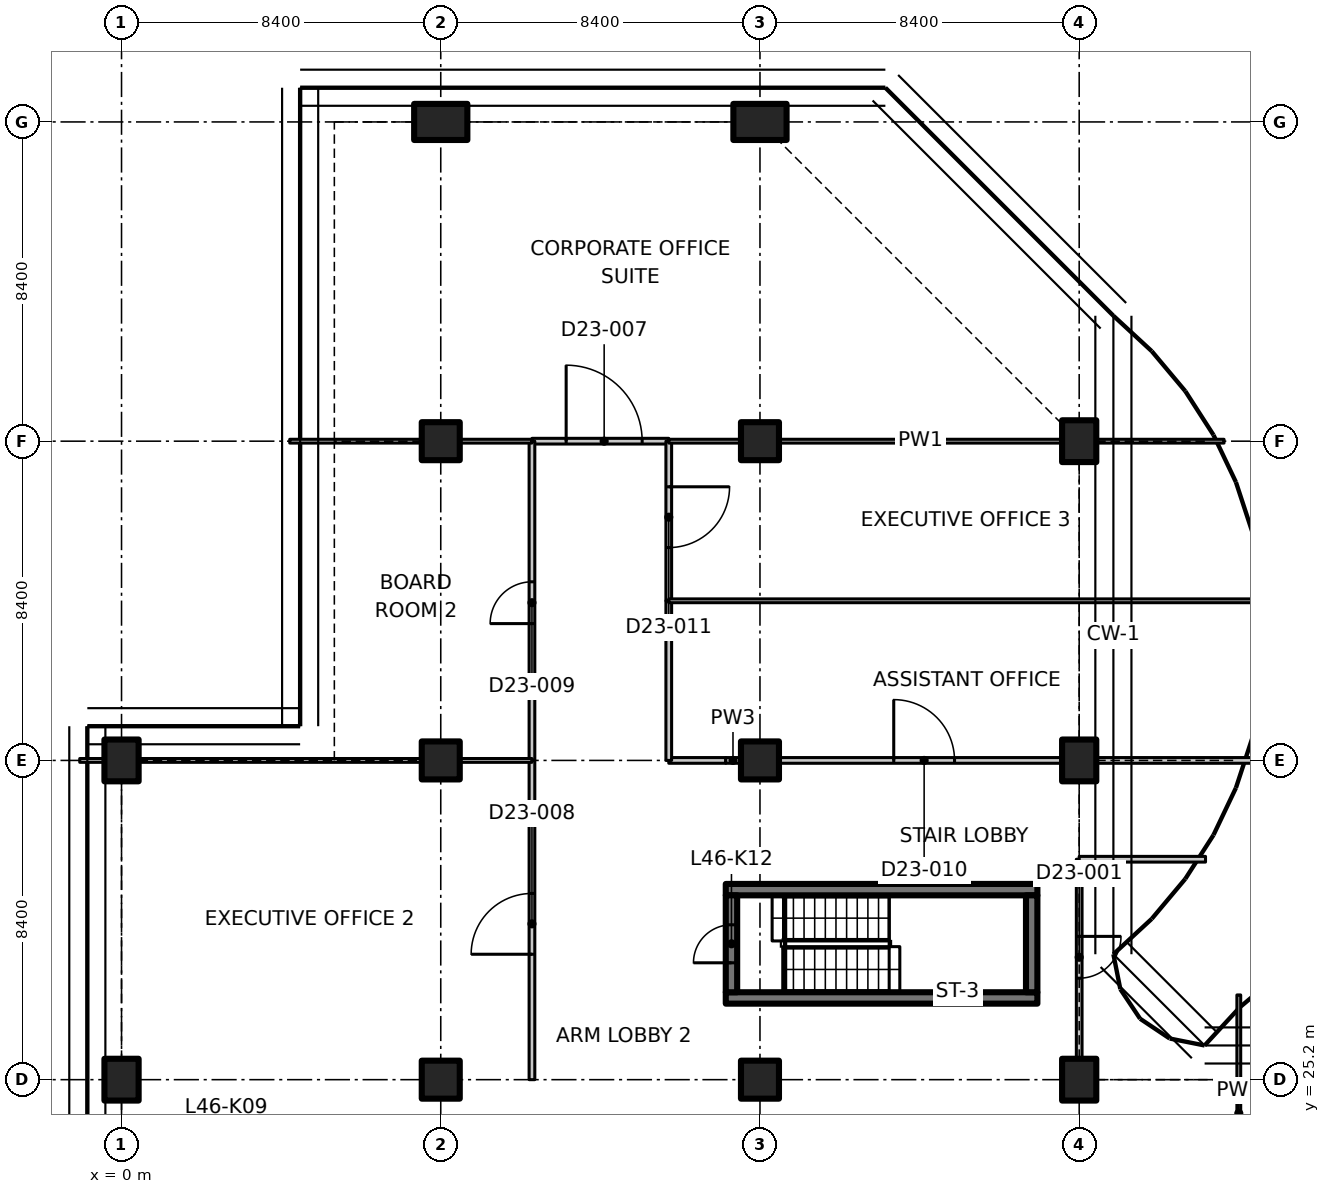
"""IFC4 building model, lengths in metres.
Left out: names, types, materials, properties, quantities, classifications, styles, units other than length and angle.
Written with IfcOpenShell. Run it as: python <this file> out.ifc"""

import sys

from ifc_helpers import new_model, si_unit, direction, frame, frame_2d, origin, origin_2d, place, context, subcontext, project, spatial, polyline, rectangle, outline, extrude, element, fill, save


model = new_model("IFC4")
c1 = context("Model", 3, precision=1e-05, world=origin(), true_north=direction((0.0, 1.0)))
c2 = subcontext(c1, "Body", "Model", "MODEL_VIEW")
j1 = project(units=[si_unit("LENGTHUNIT", "METRE"), si_unit("PLANEANGLEUNIT", "RADIAN")], contexts=[c1])
p1 = place(None, origin())
s1 = spatial("IfcSite", under=j1, at=p1, CompositionType="ELEMENT")
p2 = place(p1, origin())
s2 = spatial("IfcBuilding", under=s1, at=p2, CompositionType="ELEMENT")
p3 = place(p2, frame((0.0, 0.0, 184.8)))
s3 = spatial("IfcBuildingStorey", under=s2, at=p3, CompositionType="ELEMENT", Elevation=184.8)
for number, where, z_axis, x_axis in (
    (1, (0.0, 25.2, 0.0), (0.0, 0.0, 1.0), (1.0, 0.0, 0.0)),
    (2, (0.0, 33.6, 0.0), (0.0, 0.0, 1.0), (1.0, 0.0, 0.0)),
):
    element("IfcColumn", number, at=place(p3, frame(where, z_axis=z_axis, x_axis=x_axis)), inside=s3, PredefinedType="COLUMN", context=c2, shape_type="SweptSolid", body=[
        extrude(rectangle(XDim=0.9, YDim=1.1, at=origin_2d()), origin(), (0.0, 0.0, 1.0), 3.35),
    ])
for number, where, z_axis, x_axis in (
    (3, (8.4, 25.2, 0.0), (0.0, 0.0, 1.0), (1.0, 0.0, 0.0)),
    (4, (8.4, 33.6, 0.0), (0.0, 0.0, 1.0), (1.0, 0.0, 0.0)),
    (5, (8.4, 42.0, 0.0), (0.0, 0.0, 1.0), (1.0, 0.0, 0.0)),
):
    element("IfcColumn", number, at=place(p3, frame(where, z_axis=z_axis, x_axis=x_axis)), inside=s3, PredefinedType="COLUMN", context=c2, shape_type="SweptSolid", body=[
        extrude(rectangle(XDim=1.0, YDim=1.0, at=origin_2d()), origin(), (0.0, 0.0, 1.0), 3.35),
    ])
p4 = place(p3, frame((8.4, 50.4, 0.0), z_axis=(0.0, 0.0, 1.0), x_axis=(0.0, 1.0, 0.0)))
e6 = element("IfcColumn", 6, at=p4, inside=s3, PredefinedType="COLUMN", context=c2, shape_type="SweptSolid", body=[
    extrude(rectangle(XDim=0.95, YDim=1.4, at=origin_2d()), origin(), (0.0, 0.0, 1.0), 3.35),
])
for number, where, z_axis, x_axis in (
    (7, (16.8, 25.2, 0.0), (0.0, 0.0, 1.0), (1.0, 0.0, 0.0)),
    (8, (16.8, 33.6, 0.0), (0.0, 0.0, 1.0), (1.0, 0.0, 0.0)),
    (9, (16.8, 42.0, 0.0), (0.0, 0.0, 1.0), (1.0, 0.0, 0.0)),
):
    element("IfcColumn", number, at=place(p3, frame(where, z_axis=z_axis, x_axis=x_axis)), inside=s3, PredefinedType="COLUMN", context=c2, shape_type="SweptSolid", body=[
        extrude(rectangle(XDim=1.0, YDim=1.0, at=origin_2d()), origin(), (0.0, 0.0, 1.0), 3.35),
    ])
p5 = place(p3, frame((16.8, 50.4, 0.0), z_axis=(0.0, 0.0, 1.0), x_axis=(0.0, 1.0, 0.0)))
e10 = element("IfcColumn", 10, at=p5, inside=s3, PredefinedType="COLUMN", context=c2, shape_type="SweptSolid", body=[
    extrude(rectangle(XDim=0.95, YDim=1.4, at=origin_2d()), origin(), (0.0, 0.0, 1.0), 3.35),
])
for number, where, z_axis, x_axis in (
    (11, (25.2, 25.2, 0.0), (0.0, 0.0, 1.0), (1.0, 0.0, 0.0)),
    (12, (25.2, 33.6, 0.0), (0.0, 0.0, 1.0), (1.0, 0.0, 0.0)),
    (13, (25.2, 42.0, 0.0), (0.0, 0.0, 1.0), (1.0, 0.0, 0.0)),
):
    element("IfcColumn", number, at=place(p3, frame(where, z_axis=z_axis, x_axis=x_axis)), inside=s3, PredefinedType="COLUMN", context=c2, shape_type="SweptSolid", body=[
        extrude(rectangle(XDim=0.9, YDim=1.1, at=origin_2d()), origin(), (0.0, 0.0, 1.0), 3.35),
    ])
for number, where, z_axis, x_axis in (
    (14, (15.9, 27.35, 0.0), (0.0, 0.0, 1.0), (1.0, 0.0, 0.0)),
    (15, (15.9, 30.2, 0.0), (0.0, 0.0, 1.0), (1.0, 0.0, 0.0)),
):
    element("IfcWall", number, at=place(p3, frame(where, z_axis=z_axis, x_axis=x_axis)), inside=s3, PredefinedType="SHEAR", context=c2, shape_type="SweptSolid", body=[
        extrude(rectangle(XDim=8.2, YDim=0.3, at=frame_2d((4.1, 0.0))), origin(), (0.0, 0.0, 1.0), 3.35),
    ])
p6 = place(p3, frame((16.05, 27.5, 0.0), z_axis=(0.0, 0.0, 1.0), x_axis=(0.0, 1.0, 0.0)))
e16 = element("IfcWall", 16, at=p6, inside=s3, PredefinedType="SHEAR", context=c2, shape_type="SweptSolid", body=[
    extrude(rectangle(XDim=2.55, YDim=0.3, at=frame_2d((1.275, 0.0))), origin(), (0.0, 0.0, 1.0), 3.35),
])
p7 = place(p6, frame((0.775, 0.0, 0.0)))
e17 = element("IfcOpeningElement", 17, at=p7, cuts=e16, PredefinedType="OPENING", context=c2, shape_type="SweptSolid", body=[
    extrude(rectangle(XDim=1.0, YDim=2.1, at=frame_2d((0.5, 1.05))), frame((0.0, 0.16, 0.0), z_axis=(0.0, -1.0, 0.0), x_axis=(1.0, 0.0, 0.0)), (0.0, 0.0, 1.0), 0.32),
])
p8 = place(p3, frame((23.95, 27.5, 0.0), z_axis=(0.0, 0.0, 1.0), x_axis=(0.0, 1.0, 0.0)))
e18 = element("IfcWall", 18, at=p8, inside=s3, PredefinedType="SHEAR", context=c2, shape_type="SweptSolid", body=[
    extrude(rectangle(XDim=2.55, YDim=0.3, at=frame_2d((1.275, 0.0))), origin(), (0.0, 0.0, 1.0), 3.35),
])
p9 = place(p3, frame((29.4, 27.429, 0.0), z_axis=(0.0, 0.0, 1.0), x_axis=(0.0, -1.0, 0.0)))
e19 = element("IfcWall", 19, at=p9, inside=s3, PredefinedType="PARTITIONING", context=c2, shape_type="SweptSolid", body=[
    extrude(outline(polyline([(0.0, 0.0), (6.229, 0.0), (6.229, 3.33), (2.679, 3.33), (2.677, 2.98), (1.781, 2.98), (1.779, 3.33), (0.154, 3.33), (0.0, 3.33), (0.0, 0.0)])), frame((0.0, 0.05, 0.0), z_axis=(0.0, -1.0, 0.0), x_axis=(1.0, 0.0, 0.0)), (0.0, 0.0, 1.0), 0.1),
])
p10 = place(p3, frame((25.2, 31.0, 0.0), z_axis=(0.0, 0.0, 1.0), x_axis=(0.0, -1.0, 0.0)))
e20 = element("IfcWall", 20, at=p10, inside=s3, PredefinedType="PARTITIONING", context=c2, shape_type="SweptSolid", body=[
    extrude(outline(polyline([(0.0, 0.0), (5.23, 0.0), (5.23, 2.98), (0.0, 2.98), (0.0, 0.0)])), frame((0.0, 0.075, 0.0), z_axis=(0.0, -1.0, 0.0), x_axis=(1.0, 0.0, 0.0)), (0.0, 0.0, 1.0), 0.15),
])
p11 = place(p10, frame((2.03, 0.0, 0.0)))
e21 = element("IfcOpeningElement", 21, at=p11, cuts=e20, PredefinedType="OPENING", context=c2, shape_type="SweptSolid", body=[
    extrude(rectangle(XDim=1.1, YDim=2.1, at=frame_2d((0.55, 1.05))), frame((0.0, 0.085, 0.0), z_axis=(0.0, -1.0, 0.0), x_axis=(1.0, 0.0, 0.0)), (0.0, 0.0, 1.0), 0.17),
])
p12 = place(p3, frame((25.2, 31.0, 0.0), z_axis=(0.0, 0.0, 1.0), x_axis=(1.0, 0.0, 0.0)))
e22 = element("IfcWall", 22, at=p12, inside=s3, PredefinedType="PARTITIONING", context=c2, shape_type="SweptSolid", body=[
    extrude(rectangle(XDim=3.324, YDim=0.15, at=frame_2d((1.662, 0.0))), origin(), (0.0, 0.0, 1.0), 2.98),
])
p13 = place(p3, frame((10.8, 25.2, 0.0), z_axis=(0.0, 0.0, 1.0), x_axis=(0.0, 1.0, 0.0)))
e23 = element("IfcWall", 23, at=p13, inside=s3, PredefinedType="PARTITIONING", context=c2, shape_type="SweptSolid", body=[
    extrude(rectangle(XDim=8.4, YDim=0.15, at=frame_2d((4.2, 0.0))), origin(), (0.0, 0.0, 1.0), 3.33),
])
p14 = place(p13, frame((3.3, 0.0, 0.0)))
e24 = element("IfcOpeningElement", 24, at=p14, cuts=e23, PredefinedType="OPENING", context=c2, shape_type="SweptSolid", body=[
    extrude(rectangle(XDim=1.6, YDim=2.1, at=frame_2d((0.8, 1.05))), frame((0.0, 0.085, 0.0), z_axis=(0.0, -1.0, 0.0), x_axis=(1.0, 0.0, 0.0)), (0.0, 0.0, 1.0), 0.17),
])
p15 = place(p3, frame((14.4, 33.6, 0.0), z_axis=(0.0, 0.0, 1.0), x_axis=(1.0, 0.0, 0.0)))
e25 = element("IfcWall", 25, at=p15, inside=s3, PredefinedType="PARTITIONING", context=c2, shape_type="SweptSolid", body=[
    extrude(rectangle(XDim=1.5, YDim=0.15, at=frame_2d((0.75, 0.0))), origin(), (0.0, 0.0, 1.0), 3.33),
])
p16 = place(p3, frame((15.9, 33.6, 0.0), z_axis=(0.0, 0.0, 1.0), x_axis=(1.0, 0.0, 0.0)))
e26 = element("IfcWall", 26, at=p16, inside=s3, PredefinedType="PARTITIONING", context=c2, shape_type="SweptSolid", body=[
    extrude(rectangle(XDim=0.38, YDim=0.15, at=frame_2d((0.19, 0.0))), origin(), (0.0, 0.0, 1.0), 3.33),
])
p17 = place(p3, frame((17.32, 33.6, 0.0), z_axis=(0.0, 0.0, 1.0), x_axis=(1.0, 0.0, 0.0)))
e27 = element("IfcWall", 27, at=p17, inside=s3, PredefinedType="PARTITIONING", context=c2, shape_type="SweptSolid", body=[
    extrude(rectangle(XDim=7.41, YDim=0.15, at=frame_2d((3.705, 0.0))), origin(), (0.0, 0.0, 1.0), 3.33),
])
p18 = place(p17, frame((3.0, 0.0, 0.0)))
e28 = element("IfcOpeningElement", 28, at=p18, cuts=e27, PredefinedType="OPENING", context=c2, shape_type="SweptSolid", body=[
    extrude(rectangle(XDim=1.6, YDim=2.1, at=frame_2d((0.8, 1.05))), frame((0.0, 0.085, 0.0), z_axis=(0.0, -1.0, 0.0), x_axis=(1.0, 0.0, 0.0)), (0.0, 0.0, 1.0), 0.17),
])
p19 = place(p3, frame((25.67, 33.6, 0.0), z_axis=(0.0, 0.0, 1.0), x_axis=(1.0, 0.0, 0.0)))
e29 = element("IfcWall", 29, at=p19, inside=s3, PredefinedType="PARTITIONING", context=c2, shape_type="SweptSolid", body=[
    extrude(rectangle(XDim=4.092, YDim=0.15, at=frame_2d((2.046, 0.0))), origin(), (0.0, 0.0, 1.0), 2.98),
])
p20 = place(p3, frame((10.8, 42.0, 0.0), z_axis=(0.0, 0.0, 1.0), x_axis=(1.0, 0.0, 0.0)))
e30 = element("IfcWall", 30, at=p20, inside=s3, PredefinedType="PARTITIONING", context=c2, shape_type="SweptSolid", body=[
    extrude(rectangle(XDim=3.6, YDim=0.15, at=frame_2d((1.8, 0.0))), origin(), (0.0, 0.0, 1.0), 3.33),
])
p21 = place(p20, frame((0.9, 0.0, 0.0)))
e31 = element("IfcOpeningElement", 31, at=p21, cuts=e30, PredefinedType="OPENING", context=c2, shape_type="SweptSolid", body=[
    extrude(rectangle(XDim=2.0, YDim=2.4, at=frame_2d((1.0, 1.2))), frame((0.0, 0.085, 0.0), z_axis=(0.0, -1.0, 0.0), x_axis=(1.0, 0.0, 0.0)), (0.0, 0.0, 1.0), 0.17),
])
p22 = place(p3, frame((10.8, 33.6, 0.0), z_axis=(0.0, 0.0, 1.0), x_axis=(0.0, 1.0, 0.0)))
e32 = element("IfcWall", 32, at=p22, inside=s3, PredefinedType="PARTITIONING", context=c2, shape_type="SweptSolid", body=[
    extrude(rectangle(XDim=8.4, YDim=0.15, at=frame_2d((4.2, 0.0))), origin(), (0.0, 0.0, 1.0), 3.33),
])
p23 = place(p22, frame((3.6, 0.0, 0.0)))
e33 = element("IfcOpeningElement", 33, at=p23, cuts=e32, PredefinedType="OPENING", context=c2, shape_type="SweptSolid", body=[
    extrude(rectangle(XDim=1.1, YDim=2.1, at=frame_2d((0.55, 1.05))), frame((0.0, 0.085, 0.0), z_axis=(0.0, -1.0, 0.0), x_axis=(1.0, 0.0, 0.0)), (0.0, 0.0, 1.0), 0.17),
])
p24 = place(p3, frame((14.4, 37.8, 0.0), z_axis=(0.0, 0.0, 1.0), x_axis=(0.0, -1.0, 0.0)))
e34 = element("IfcWall", 34, at=p24, inside=s3, PredefinedType="PARTITIONING", context=c2, shape_type="SweptSolid", body=[
    extrude(rectangle(XDim=4.2, YDim=0.15, at=frame_2d((2.1, 0.0))), origin(), (0.0, 0.0, 1.0), 3.33),
])
p25 = place(p3, frame((14.4, 42.0, 0.0), z_axis=(0.0, 0.0, 1.0), x_axis=(0.0, -1.0, 0.0)))
e35 = element("IfcWall", 35, at=p25, inside=s3, PredefinedType="PARTITIONING", context=c2, shape_type="SweptSolid", body=[
    extrude(rectangle(XDim=4.2, YDim=0.15, at=frame_2d((2.1, 0.0))), origin(), (0.0, 0.0, 1.0), 3.33),
])
p26 = place(p25, frame((1.2, 0.0, 0.0)))
e36 = element("IfcOpeningElement", 36, at=p26, cuts=e35, PredefinedType="OPENING", context=c2, shape_type="SweptSolid", body=[
    extrude(rectangle(XDim=1.6, YDim=2.1, at=frame_2d((0.8, 1.05))), frame((0.0, 0.085, 0.0), z_axis=(0.0, -1.0, 0.0), x_axis=(1.0, 0.0, 0.0)), (0.0, 0.0, 1.0), 0.17),
])
p27 = place(p3, frame((10.8, 42.0, 0.0), z_axis=(0.0, 0.0, 1.0), x_axis=(-1.0, 0.0, 0.0)))
e37 = element("IfcWall", 37, at=p27, inside=s3, PredefinedType="PARTITIONING", context=c2, shape_type="SweptSolid", body=[
    extrude(rectangle(XDim=1.88, YDim=0.1, at=frame_2d((0.94, 0.0))), origin(), (0.0, 0.0, 1.0), 3.33),
])
p28 = place(p3, frame((7.88, 42.0, 0.0), z_axis=(0.0, 0.0, 1.0), x_axis=(-1.0, 0.0, 0.0)))
e38 = element("IfcWall", 38, at=p28, inside=s3, PredefinedType="PARTITIONING", context=c2, shape_type="SweptSolid", body=[
    extrude(rectangle(XDim=3.454, YDim=0.1, at=frame_2d((1.727, 0.0))), origin(), (0.0, 0.0, 1.0), 2.98),
])
p29 = place(p3, frame((29.011, 42.0, 0.0), z_axis=(0.0, 0.0, 1.0), x_axis=(-1.0, 0.0, 0.0)))
e39 = element("IfcWall", 39, at=p29, inside=s3, PredefinedType="PARTITIONING", context=c2, shape_type="SweptSolid", body=[
    extrude(rectangle(XDim=3.342, YDim=0.1, at=frame_2d((1.671, 0.0))), origin(), (0.0, 0.0, 1.0), 2.98),
])
p30 = place(p3, frame((24.73, 42.0, 0.0), z_axis=(0.0, 0.0, 1.0), x_axis=(-1.0, 0.0, 0.0)))
e40 = element("IfcWall", 40, at=p30, inside=s3, PredefinedType="PARTITIONING", context=c2, shape_type="SweptSolid", body=[
    extrude(outline(polyline([(0.0, 0.0), (7.41, 0.0), (7.41, 3.33), (0.196, 3.33), (0.194, 2.98), (0.0, 2.98), (0.0, 0.0)])), frame((0.0, 0.05, 0.0), z_axis=(0.0, -1.0, 0.0), x_axis=(1.0, 0.0, 0.0)), (0.0, 0.0, 1.0), 0.1),
])
p31 = place(p3, frame((16.28, 42.0, 0.0), z_axis=(0.0, 0.0, 1.0), x_axis=(-1.0, 0.0, 0.0)))
e41 = element("IfcWall", 41, at=p31, inside=s3, PredefinedType="PARTITIONING", context=c2, shape_type="SweptSolid", body=[
    extrude(rectangle(XDim=1.88, YDim=0.1, at=frame_2d((0.94, 0.0))), origin(), (0.0, 0.0, 1.0), 3.33),
])
p32 = place(p3, frame((-1.1, 33.6, 0.0), z_axis=(0.0, 0.0, 1.0), x_axis=(1.0, 0.0, 0.0)))
e42 = element("IfcWall", 42, at=p32, inside=s3, PredefinedType="PARTITIONING", context=c2, shape_type="SweptSolid", body=[
    extrude(rectangle(XDim=0.63, YDim=0.1, at=frame_2d((0.315, 0.0))), origin(), (0.0, 0.0, 1.0), 3.33),
])
p33 = place(p3, frame((0.47, 33.6, 0.0), z_axis=(0.0, 0.0, 1.0), x_axis=(1.0, 0.0, 0.0)))
e43 = element("IfcWall", 43, at=p33, inside=s3, PredefinedType="PARTITIONING", context=c2, shape_type="SweptSolid", body=[
    extrude(outline(polyline([(0.0, 0.0), (7.41, 0.0), (7.41, 2.98), (0.0, 2.98), (0.0, 0.0)])), frame((0.0, 0.05, 0.0), z_axis=(0.0, -1.0, 0.0), x_axis=(1.0, 0.0, 0.0)), (0.0, 0.0, 1.0), 0.1),
])
p34 = place(p3, frame((8.92, 33.6, 0.0), z_axis=(0.0, 0.0, 1.0), x_axis=(1.0, 0.0, 0.0)))
e44 = element("IfcWall", 44, at=p34, inside=s3, PredefinedType="PARTITIONING", context=c2, shape_type="SweptSolid", body=[
    extrude(rectangle(XDim=1.88, YDim=0.1, at=frame_2d((0.94, 0.0))), origin(), (0.0, 0.0, 1.0), 3.33),
])
p35 = place(p3, frame((14.4, 37.8, 0.0), z_axis=(0.0, 0.0, 1.0), x_axis=(1.0, 0.0, 0.0)))
e45 = element("IfcWall", 45, at=p35, inside=s3, PredefinedType="PARTITIONING", context=c2, shape_type="SweptSolid", body=[
    extrude(outline(polyline([(0.0, 0.0), (15.843, 0.0), (15.843, 3.33), (11.25, 3.33), (11.248, 2.98), (10.352, 2.98), (10.35, 3.33), (0.0, 3.33), (0.0, 0.0)])), frame((0.0, 0.05, 0.0), z_axis=(0.0, -1.0, 0.0), x_axis=(1.0, 0.0, 0.0)), (0.0, 0.0, 1.0), 0.1),
])
p36 = place(p7, origin())
e46 = element("IfcDoor", 46, at=p36, inside=s3, OperationType="SINGLE_SWING_LEFT", PredefinedType="DOOR", context=c2, shape_type="SweptSolid", body=[
    extrude(rectangle(XDim=1.0, YDim=2.1, at=frame_2d((0.5, 1.05))), frame((0.0, 0.025, 0.0), z_axis=(0.0, -1.0, 0.0), x_axis=(1.0, 0.0, 0.0)), (0.0, 0.0, 1.0), 0.05),
])
fill(e17, e46)
p37 = place(p11, origin())
e47 = element("IfcDoor", 47, at=p37, inside=s3, OperationType="SINGLE_SWING_RIGHT", PredefinedType="DOOR", context=c2, shape_type="SweptSolid", body=[
    extrude(rectangle(XDim=1.1, YDim=2.1, at=frame_2d((0.55, 1.05))), frame((0.0, 0.025, 0.0), z_axis=(0.0, -1.0, 0.0), x_axis=(1.0, 0.0, 0.0)), (0.0, 0.0, 1.0), 0.05),
])
fill(e21, e47)
p38 = place(p21, origin())
e48 = element("IfcDoor", 48, at=p38, inside=s3, OperationType="DOUBLE_DOOR_SINGLE_SWING", PredefinedType="DOOR", context=c2, shape_type="SweptSolid", body=[
    extrude(rectangle(XDim=2.0, YDim=2.4, at=frame_2d((1.0, 1.2))), frame((0.0, 0.025, 0.0), z_axis=(0.0, -1.0, 0.0), x_axis=(1.0, 0.0, 0.0)), (0.0, 0.0, 1.0), 0.05),
])
fill(e31, e48)
p39 = place(p14, origin())
e49 = element("IfcDoor", 49, at=p39, inside=s3, OperationType="DOUBLE_DOOR_SINGLE_SWING", PredefinedType="DOOR", context=c2, shape_type="SweptSolid", body=[
    extrude(rectangle(XDim=1.6, YDim=2.1, at=frame_2d((0.8, 1.05))), frame((0.0, 0.025, 0.0), z_axis=(0.0, -1.0, 0.0), x_axis=(1.0, 0.0, 0.0)), (0.0, 0.0, 1.0), 0.05),
])
fill(e24, e49)
p40 = place(p23, origin())
e50 = element("IfcDoor", 50, at=p40, inside=s3, OperationType="SINGLE_SWING_LEFT", PredefinedType="DOOR", context=c2, shape_type="SweptSolid", body=[
    extrude(rectangle(XDim=1.1, YDim=2.1, at=frame_2d((0.55, 1.05))), frame((0.0, 0.025, 0.0), z_axis=(0.0, -1.0, 0.0), x_axis=(1.0, 0.0, 0.0)), (0.0, 0.0, 1.0), 0.05),
])
fill(e33, e50)
p41 = place(p18, origin())
e51 = element("IfcDoor", 51, at=p41, inside=s3, OperationType="DOUBLE_DOOR_SINGLE_SWING", PredefinedType="DOOR", context=c2, shape_type="SweptSolid", body=[
    extrude(rectangle(XDim=1.6, YDim=2.1, at=frame_2d((0.8, 1.05))), frame((0.0, 0.025, 0.0), z_axis=(0.0, -1.0, 0.0), x_axis=(1.0, 0.0, 0.0)), (0.0, 0.0, 1.0), 0.05),
])
fill(e28, e51)
p42 = place(p26, origin())
e52 = element("IfcDoor", 52, at=p42, inside=s3, OperationType="DOUBLE_DOOR_SINGLE_SWING", PredefinedType="DOOR", context=c2, shape_type="SweptSolid", body=[
    extrude(rectangle(XDim=1.6, YDim=2.1, at=frame_2d((0.8, 1.05))), frame((0.0, 0.025, 0.0), z_axis=(0.0, -1.0, 0.0), x_axis=(1.0, 0.0, 0.0)), (0.0, 0.0, 1.0), 0.05),
])
fill(e36, e52)
save(model, sys.argv[1])
